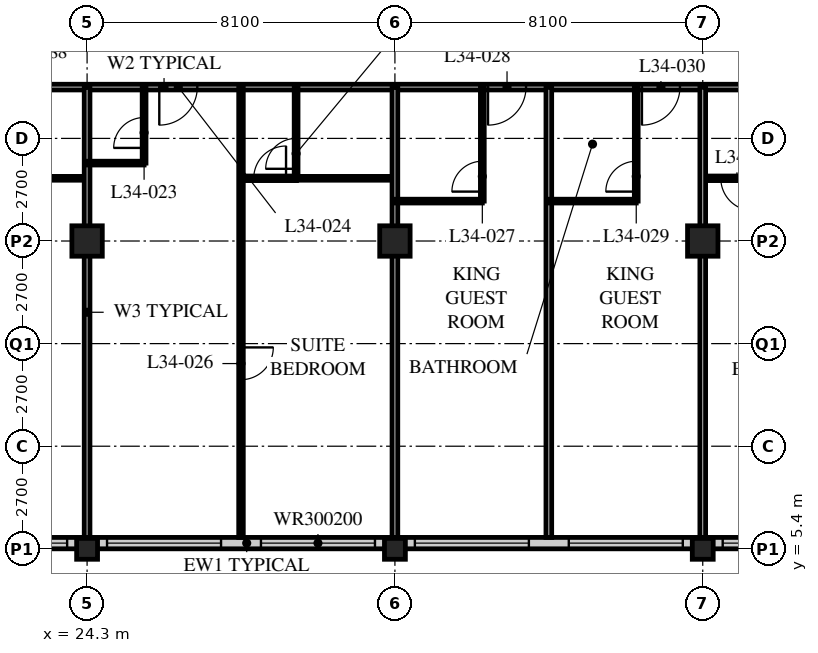
"""IFC4 building model, lengths in metres.
Left out: names, types, materials, properties, quantities, classifications, styles, units other than length and angle.
Written with IfcOpenShell. Run it as: python <this file> out.ifc"""

import sys

from ifc_helpers import new_model, si_unit, direction, frame, frame_2d, origin, origin_2d, place, context, subcontext, project, spatial, rectangle, hollow_rectangle, extrude, element, fill, save


model = new_model("IFC4")
c1 = context("Model", 3, precision=1e-05, world=origin(), true_north=direction((0.0, 1.0)))
c2 = subcontext(c1, "Body", "Model", "MODEL_VIEW")
j1 = project(units=[si_unit("LENGTHUNIT", "METRE"), si_unit("PLANEANGLEUNIT", "RADIAN")], contexts=[c1])
p1 = place(None, origin())
s1 = spatial("IfcSite", under=j1, at=p1, CompositionType="ELEMENT")
p2 = place(p1, origin())
s2 = spatial("IfcBuilding", under=s1, at=p2, CompositionType="ELEMENT")
p3 = place(p2, frame((0.0, 0.0, 134.0)))
s3 = spatial("IfcBuildingStorey", under=s2, at=p3, CompositionType="ELEMENT", Elevation=134.0)
p4 = place(p3, frame((24.3, 5.4, 0.0), z_axis=(0.0, 0.0, 1.0), x_axis=(1.0, 0.0, 0.0)))
e1 = element("IfcColumn", 1, at=p4, inside=s3, PredefinedType="COLUMN", context=c2, shape_type="SweptSolid", body=[
    extrude(hollow_rectangle(XDim=0.55, YDim=0.55, WallThickness=0.04, at=origin_2d()), origin(), (0.0, 0.0, 1.0), 3.4),
])
p5 = place(p3, frame((24.3, 13.5, 0.0), z_axis=(0.0, 0.0, 1.0), x_axis=(1.0, 0.0, 0.0)))
e2 = element("IfcColumn", 2, at=p5, inside=s3, PredefinedType="COLUMN", context=c2, shape_type="SweptSolid", body=[
    extrude(hollow_rectangle(XDim=0.8, YDim=0.8, WallThickness=0.08, at=origin_2d()), origin(), (0.0, 0.0, 1.0), 3.4),
])
p6 = place(p3, frame((32.4, 5.4, 0.0), z_axis=(0.0, 0.0, 1.0), x_axis=(1.0, 0.0, 0.0)))
e3 = element("IfcColumn", 3, at=p6, inside=s3, PredefinedType="COLUMN", context=c2, shape_type="SweptSolid", body=[
    extrude(hollow_rectangle(XDim=0.55, YDim=0.55, WallThickness=0.04, at=origin_2d()), origin(), (0.0, 0.0, 1.0), 3.4),
])
p7 = place(p3, frame((32.4, 13.5, 0.0), z_axis=(0.0, 0.0, 1.0), x_axis=(1.0, 0.0, 0.0)))
e4 = element("IfcColumn", 4, at=p7, inside=s3, PredefinedType="COLUMN", context=c2, shape_type="SweptSolid", body=[
    extrude(hollow_rectangle(XDim=0.8, YDim=0.8, WallThickness=0.08, at=origin_2d()), origin(), (0.0, 0.0, 1.0), 3.4),
])
p8 = place(p3, frame((40.5, 5.4, 0.0), z_axis=(0.0, 0.0, 1.0), x_axis=(1.0, 0.0, 0.0)))
e5 = element("IfcColumn", 5, at=p8, inside=s3, PredefinedType="COLUMN", context=c2, shape_type="SweptSolid", body=[
    extrude(hollow_rectangle(XDim=0.55, YDim=0.55, WallThickness=0.04, at=origin_2d()), origin(), (0.0, 0.0, 1.0), 3.4),
])
p9 = place(p3, frame((40.5, 13.5, 0.0), z_axis=(0.0, 0.0, 1.0), x_axis=(1.0, 0.0, 0.0)))
e6 = element("IfcColumn", 6, at=p9, inside=s3, PredefinedType="COLUMN", context=c2, shape_type="SweptSolid", body=[
    extrude(hollow_rectangle(XDim=0.8, YDim=0.8, WallThickness=0.08, at=origin_2d()), origin(), (0.0, 0.0, 1.0), 3.4),
])
p10 = place(p3, frame((8.4, 5.55, 0.0), z_axis=(0.0, 0.0, 1.0), x_axis=(1.0, 0.0, 0.0)))
e7 = element("IfcWall", 7, at=p10, inside=s3, PredefinedType="SOLIDWALL", context=c2, shape_type="SweptSolid", body=[
    extrude(rectangle(XDim=40.2, YDim=0.3, at=frame_2d((20.1, 0.0))), origin(), (0.0, 0.0, 1.0), 3.19),
])
p11 = place(p10, frame((0.225, 0.0, 0.9)))
e8 = element("IfcOpeningElement", 8, at=p11, cuts=e7, PredefinedType="OPENING", context=c2, shape_type="SweptSolid", body=[
    extrude(rectangle(XDim=3.0, YDim=2.0, at=frame_2d((1.5, 1.0))), frame((0.0, 0.16, 0.0), z_axis=(0.0, -1.0, 0.0), x_axis=(1.0, 0.0, 0.0)), (0.0, 0.0, 1.0), 0.32),
])
p12 = place(p10, frame((4.275, 0.0, 0.9)))
e9 = element("IfcOpeningElement", 9, at=p12, cuts=e7, PredefinedType="OPENING", context=c2, shape_type="SweptSolid", body=[
    extrude(rectangle(XDim=3.0, YDim=2.0, at=frame_2d((1.5, 1.0))), frame((0.0, 0.16, 0.0), z_axis=(0.0, -1.0, 0.0), x_axis=(1.0, 0.0, 0.0)), (0.0, 0.0, 1.0), 0.32),
])
p13 = place(p10, frame((8.325, 0.0, 0.9)))
e10 = element("IfcOpeningElement", 10, at=p13, cuts=e7, PredefinedType="OPENING", context=c2, shape_type="SweptSolid", body=[
    extrude(rectangle(XDim=3.0, YDim=2.0, at=frame_2d((1.5, 1.0))), frame((0.0, 0.16, 0.0), z_axis=(0.0, -1.0, 0.0), x_axis=(1.0, 0.0, 0.0)), (0.0, 0.0, 1.0), 0.32),
])
p14 = place(p10, frame((12.375, 0.0, 0.9)))
e11 = element("IfcOpeningElement", 11, at=p14, cuts=e7, PredefinedType="OPENING", context=c2, shape_type="SweptSolid", body=[
    extrude(rectangle(XDim=3.0, YDim=2.0, at=frame_2d((1.5, 1.0))), frame((0.0, 0.16, 0.0), z_axis=(0.0, -1.0, 0.0), x_axis=(1.0, 0.0, 0.0)), (0.0, 0.0, 1.0), 0.32),
])
p15 = place(p10, frame((16.425, 0.0, 0.9)))
e12 = element("IfcOpeningElement", 12, at=p15, cuts=e7, PredefinedType="OPENING", context=c2, shape_type="SweptSolid", body=[
    extrude(rectangle(XDim=3.0, YDim=2.0, at=frame_2d((1.5, 1.0))), frame((0.0, 0.16, 0.0), z_axis=(0.0, -1.0, 0.0), x_axis=(1.0, 0.0, 0.0)), (0.0, 0.0, 1.0), 0.32),
])
p16 = place(p10, frame((20.475, 0.0, 0.9)))
e13 = element("IfcOpeningElement", 13, at=p16, cuts=e7, PredefinedType="OPENING", context=c2, shape_type="SweptSolid", body=[
    extrude(rectangle(XDim=3.0, YDim=2.0, at=frame_2d((1.5, 1.0))), frame((0.0, 0.16, 0.0), z_axis=(0.0, -1.0, 0.0), x_axis=(1.0, 0.0, 0.0)), (0.0, 0.0, 1.0), 0.32),
])
p17 = place(p10, frame((24.525, 0.0, 0.9)))
e14 = element("IfcOpeningElement", 14, at=p17, cuts=e7, PredefinedType="OPENING", context=c2, shape_type="SweptSolid", body=[
    extrude(rectangle(XDim=3.0, YDim=2.0, at=frame_2d((1.5, 1.0))), frame((0.0, 0.16, 0.0), z_axis=(0.0, -1.0, 0.0), x_axis=(1.0, 0.0, 0.0)), (0.0, 0.0, 1.0), 0.32),
])
p18 = place(p10, frame((28.575, 0.0, 0.9)))
e15 = element("IfcOpeningElement", 15, at=p18, cuts=e7, PredefinedType="OPENING", context=c2, shape_type="SweptSolid", body=[
    extrude(rectangle(XDim=3.0, YDim=2.0, at=frame_2d((1.5, 1.0))), frame((0.0, 0.16, 0.0), z_axis=(0.0, -1.0, 0.0), x_axis=(1.0, 0.0, 0.0)), (0.0, 0.0, 1.0), 0.32),
])
p19 = place(p10, frame((32.625, 0.0, 0.9)))
e16 = element("IfcOpeningElement", 16, at=p19, cuts=e7, PredefinedType="OPENING", context=c2, shape_type="SweptSolid", body=[
    extrude(rectangle(XDim=3.0, YDim=2.0, at=frame_2d((1.5, 1.0))), frame((0.0, 0.16, 0.0), z_axis=(0.0, -1.0, 0.0), x_axis=(1.0, 0.0, 0.0)), (0.0, 0.0, 1.0), 0.32),
])
p20 = place(p10, frame((36.675, 0.0, 0.9)))
e17 = element("IfcOpeningElement", 17, at=p20, cuts=e7, PredefinedType="OPENING", context=c2, shape_type="SweptSolid", body=[
    extrude(rectangle(XDim=3.0, YDim=2.0, at=frame_2d((1.5, 1.0))), frame((0.0, 0.16, 0.0), z_axis=(0.0, -1.0, 0.0), x_axis=(1.0, 0.0, 0.0)), (0.0, 0.0, 1.0), 0.32),
])
p21 = place(p3, frame((8.1, 17.55, 0.0), z_axis=(0.0, 0.0, 1.0), x_axis=(1.0, 0.0, 0.0)))
e18 = element("IfcWall", 18, at=p21, inside=s3, PredefinedType="PARTITIONING", context=c2, shape_type="SweptSolid", body=[
    extrude(rectangle(XDim=36.45, YDim=0.15, at=frame_2d((18.225, 0.0))), origin(), (0.0, 0.0, 1.0), 3.19),
])
p22 = place(p21, frame((9.625, 0.0, 0.0)))
e19 = element("IfcOpeningElement", 19, at=p22, cuts=e18, PredefinedType="OPENING", context=c2, shape_type="SweptSolid", body=[
    extrude(rectangle(XDim=1.0, YDim=2.1, at=frame_2d((0.5, 1.05))), frame((0.0, 0.085, 0.0), z_axis=(0.0, -1.0, 0.0), x_axis=(1.0, 0.0, 0.0)), (0.0, 0.0, 1.0), 0.17),
])
p23 = place(p21, frame((18.1, 0.0, 0.0)))
e20 = element("IfcOpeningElement", 20, at=p23, cuts=e18, PredefinedType="OPENING", context=c2, shape_type="SweptSolid", body=[
    extrude(rectangle(XDim=1.0, YDim=2.1, at=frame_2d((0.5, 1.05))), frame((0.0, 0.085, 0.0), z_axis=(0.0, -1.0, 0.0), x_axis=(1.0, 0.0, 0.0)), (0.0, 0.0, 1.0), 0.17),
])
p24 = place(p21, frame((26.75, 0.0, 0.0)))
e21 = element("IfcOpeningElement", 21, at=p24, cuts=e18, PredefinedType="OPENING", context=c2, shape_type="SweptSolid", body=[
    extrude(rectangle(XDim=1.0, YDim=2.1, at=frame_2d((0.5, 1.05))), frame((0.0, 0.085, 0.0), z_axis=(0.0, -1.0, 0.0), x_axis=(1.0, 0.0, 0.0)), (0.0, 0.0, 1.0), 0.17),
])
p25 = place(p21, frame((30.8, 0.0, 0.0)))
e22 = element("IfcOpeningElement", 22, at=p25, cuts=e18, PredefinedType="OPENING", context=c2, shape_type="SweptSolid", body=[
    extrude(rectangle(XDim=1.0, YDim=2.1, at=frame_2d((0.5, 1.05))), frame((0.0, 0.085, 0.0), z_axis=(0.0, -1.0, 0.0), x_axis=(1.0, 0.0, 0.0)), (0.0, 0.0, 1.0), 0.17),
])
p26 = place(p21, frame((1.525, 0.0, 0.0)))
e23 = element("IfcOpeningElement", 23, at=p26, cuts=e18, PredefinedType="OPENING", context=c2, shape_type="SweptSolid", body=[
    extrude(rectangle(XDim=1.0, YDim=2.1, at=frame_2d((0.5, 1.05))), frame((0.0, 0.085, 0.0), z_axis=(0.0, -1.0, 0.0), x_axis=(1.0, 0.0, 0.0)), (0.0, 0.0, 1.0), 0.17),
])
p27 = place(p21, frame((33.925, 0.0, 0.0)))
e24 = element("IfcOpeningElement", 24, at=p27, cuts=e18, PredefinedType="OPENING", context=c2, shape_type="SweptSolid", body=[
    extrude(rectangle(XDim=1.0, YDim=2.1, at=frame_2d((0.5, 1.05))), frame((0.0, 0.085, 0.0), z_axis=(0.0, -1.0, 0.0), x_axis=(1.0, 0.0, 0.0)), (0.0, 0.0, 1.0), 0.17),
])
p28 = place(p3, frame((21.7, 15.15, 0.0), z_axis=(0.0, 0.0, 1.0), x_axis=(1.0, 0.0, 0.0)))
e25 = element("IfcWall", 25, at=p28, inside=s3, PredefinedType="PARTITIONING", context=c2, shape_type="SweptSolid", body=[
    extrude(rectangle(XDim=2.6, YDim=0.1, at=frame_2d((1.3, 0.0))), origin(), (0.0, 0.0, 1.0), 3.19),
])
p29 = place(p3, frame((24.3, 17.55, 0.0), z_axis=(0.0, 0.0, 1.0), x_axis=(0.0, -1.0, 0.0)))
e26 = element("IfcWall", 26, at=p29, inside=s3, PredefinedType="PARTITIONING", context=c2, shape_type="SweptSolid", body=[
    extrude(rectangle(XDim=11.85, YDim=0.15, at=frame_2d((5.925, 0.0))), origin(), (0.0, 0.0, 1.0), 2.578),
])
p30 = place(p3, frame((24.3, 15.55, 0.0), z_axis=(0.0, 0.0, 1.0), x_axis=(1.0, 0.0, 0.0)))
e27 = element("IfcWall", 27, at=p30, inside=s3, PredefinedType="PARTITIONING", context=c2, shape_type="SweptSolid", body=[
    extrude(rectangle(XDim=1.5, YDim=0.1, at=frame_2d((0.75, 0.0))), origin(), (0.0, 0.0, 1.0), 3.19),
])
p31 = place(p3, frame((25.8, 17.55, 0.0), z_axis=(0.0, 0.0, 1.0), x_axis=(0.0, -1.0, 0.0)))
e28 = element("IfcWall", 28, at=p31, inside=s3, PredefinedType="PARTITIONING", context=c2, shape_type="SweptSolid", body=[
    extrude(rectangle(XDim=2.0, YDim=0.1, at=frame_2d((1.0, 0.0))), origin(), (0.0, 0.0, 1.0), 3.19),
])
p32 = place(p31, frame((0.8, 0.0, 0.0)))
e29 = element("IfcOpeningElement", 29, at=p32, cuts=e28, PredefinedType="OPENING", context=c2, shape_type="SweptSolid", body=[
    extrude(rectangle(XDim=0.8, YDim=2.1, at=frame_2d((0.4, 1.05))), frame((0.0, 0.06, 0.0), z_axis=(0.0, -1.0, 0.0), x_axis=(1.0, 0.0, 0.0)), (0.0, 0.0, 1.0), 0.12),
])
p33 = place(p3, frame((29.8, 15.15, 0.0), z_axis=(0.0, 0.0, 1.0), x_axis=(1.0, 0.0, 0.0)))
e30 = element("IfcWall", 30, at=p33, inside=s3, PredefinedType="PARTITIONING", context=c2, shape_type="SweptSolid", body=[
    extrude(rectangle(XDim=2.6, YDim=0.1, at=frame_2d((1.3, 0.0))), origin(), (0.0, 0.0, 1.0), 3.19),
])
p34 = place(p3, frame((29.8, 17.55, 0.0), z_axis=(0.0, 0.0, 1.0), x_axis=(0.0, -1.0, 0.0)))
e31 = element("IfcWall", 31, at=p34, inside=s3, PredefinedType="PARTITIONING", context=c2, shape_type="SweptSolid", body=[
    extrude(rectangle(XDim=2.4, YDim=0.1, at=frame_2d((1.2, 0.0))), origin(), (0.0, 0.0, 1.0), 3.19),
])
p35 = place(p34, frame((1.35, 0.0, 0.0)))
e32 = element("IfcOpeningElement", 32, at=p35, cuts=e31, PredefinedType="OPENING", context=c2, shape_type="SweptSolid", body=[
    extrude(rectangle(XDim=0.8, YDim=2.1, at=frame_2d((0.4, 1.05))), frame((0.0, 0.06, 0.0), z_axis=(0.0, -1.0, 0.0), x_axis=(1.0, 0.0, 0.0)), (0.0, 0.0, 1.0), 0.12),
])
p36 = place(p3, frame((28.35, 17.55, 0.0), z_axis=(0.0, 0.0, 1.0), x_axis=(0.0, -1.0, 0.0)))
e33 = element("IfcWall", 33, at=p36, inside=s3, PredefinedType="PARTITIONING", context=c2, shape_type="SweptSolid", body=[
    extrude(rectangle(XDim=11.85, YDim=0.12, at=frame_2d((5.925, 0.0))), origin(), (0.0, 0.0, 1.0), 3.19),
])
p37 = place(p36, frame((6.85, 0.0, 0.0)))
e34 = element("IfcOpeningElement", 34, at=p37, cuts=e33, PredefinedType="OPENING", context=c2, shape_type="SweptSolid", body=[
    extrude(rectangle(XDim=0.85, YDim=2.1, at=frame_2d((0.425, 1.05))), frame((0.0, 0.07, 0.0), z_axis=(0.0, -1.0, 0.0), x_axis=(1.0, 0.0, 0.0)), (0.0, 0.0, 1.0), 0.14),
])
p38 = place(p3, frame((32.4, 17.55, 0.0), z_axis=(0.0, 0.0, 1.0), x_axis=(0.0, -1.0, 0.0)))
e35 = element("IfcWall", 35, at=p38, inside=s3, PredefinedType="PARTITIONING", context=c2, shape_type="SweptSolid", body=[
    extrude(rectangle(XDim=11.85, YDim=0.15, at=frame_2d((5.925, 0.0))), origin(), (0.0, 0.0, 1.0), 2.578),
])
p39 = place(p3, frame((32.4, 14.55, 0.0), z_axis=(0.0, 0.0, 1.0), x_axis=(1.0, 0.0, 0.0)))
e36 = element("IfcWall", 36, at=p39, inside=s3, PredefinedType="PARTITIONING", context=c2, shape_type="SweptSolid", body=[
    extrude(rectangle(XDim=2.3, YDim=0.1, at=frame_2d((1.15, 0.0))), origin(), (0.0, 0.0, 1.0), 3.19),
])
p40 = place(p3, frame((34.7, 17.55, 0.0), z_axis=(0.0, 0.0, 1.0), x_axis=(0.0, -1.0, 0.0)))
e37 = element("IfcWall", 37, at=p40, inside=s3, PredefinedType="PARTITIONING", context=c2, shape_type="SweptSolid", body=[
    extrude(rectangle(XDim=3.0, YDim=0.1, at=frame_2d((1.5, 0.0))), origin(), (0.0, 0.0, 1.0), 3.19),
])
p41 = place(p40, frame((1.95, 0.0, 0.0)))
e38 = element("IfcOpeningElement", 38, at=p41, cuts=e37, PredefinedType="OPENING", context=c2, shape_type="SweptSolid", body=[
    extrude(rectangle(XDim=0.8, YDim=2.1, at=frame_2d((0.4, 1.05))), frame((0.0, 0.06, 0.0), z_axis=(0.0, -1.0, 0.0), x_axis=(1.0, 0.0, 0.0)), (0.0, 0.0, 1.0), 0.12),
])
p42 = place(p3, frame((36.45, 17.55, 0.0), z_axis=(0.0, 0.0, 1.0), x_axis=(0.0, -1.0, 0.0)))
e39 = element("IfcWall", 39, at=p42, inside=s3, PredefinedType="PARTITIONING", context=c2, shape_type="SweptSolid", body=[
    extrude(rectangle(XDim=11.85, YDim=0.15, at=frame_2d((5.925, 0.0))), origin(), (0.0, 0.0, 1.0), 3.19),
])
p43 = place(p3, frame((36.45, 14.55, 0.0), z_axis=(0.0, 0.0, 1.0), x_axis=(1.0, 0.0, 0.0)))
e40 = element("IfcWall", 40, at=p43, inside=s3, PredefinedType="PARTITIONING", context=c2, shape_type="SweptSolid", body=[
    extrude(rectangle(XDim=2.3, YDim=0.1, at=frame_2d((1.15, 0.0))), origin(), (0.0, 0.0, 1.0), 3.19),
])
p44 = place(p3, frame((38.75, 17.55, 0.0), z_axis=(0.0, 0.0, 1.0), x_axis=(0.0, -1.0, 0.0)))
e41 = element("IfcWall", 41, at=p44, inside=s3, PredefinedType="PARTITIONING", context=c2, shape_type="SweptSolid", body=[
    extrude(rectangle(XDim=3.0, YDim=0.1, at=frame_2d((1.5, 0.0))), origin(), (0.0, 0.0, 1.0), 3.19),
])
p45 = place(p44, frame((1.95, 0.0, 0.0)))
e42 = element("IfcOpeningElement", 42, at=p45, cuts=e41, PredefinedType="OPENING", context=c2, shape_type="SweptSolid", body=[
    extrude(rectangle(XDim=0.8, YDim=2.1, at=frame_2d((0.4, 1.05))), frame((0.0, 0.06, 0.0), z_axis=(0.0, -1.0, 0.0), x_axis=(1.0, 0.0, 0.0)), (0.0, 0.0, 1.0), 0.12),
])
p46 = place(p3, frame((40.5, 15.15, 0.0), z_axis=(0.0, 0.0, 1.0), x_axis=(1.0, 0.0, 0.0)))
e43 = element("IfcWall", 43, at=p46, inside=s3, PredefinedType="PARTITIONING", context=c2, shape_type="SweptSolid", body=[
    extrude(rectangle(XDim=8.05, YDim=0.12, at=frame_2d((4.025, 0.0))), origin(), (0.0, 0.0, 1.0), 3.19),
])
p47 = place(p46, frame((0.475, 0.0, 0.0)))
e44 = element("IfcOpeningElement", 44, at=p47, cuts=e43, PredefinedType="OPENING", context=c2, shape_type="SweptSolid", body=[
    extrude(rectangle(XDim=0.85, YDim=2.1, at=frame_2d((0.425, 1.05))), frame((0.0, 0.07, 0.0), z_axis=(0.0, -1.0, 0.0), x_axis=(1.0, 0.0, 0.0)), (0.0, 0.0, 1.0), 0.14),
])
p48 = place(p46, frame((4.325, 0.0, 0.0)))
e45 = element("IfcOpeningElement", 45, at=p48, cuts=e43, PredefinedType="OPENING", context=c2, shape_type="SweptSolid", body=[
    extrude(rectangle(XDim=0.85, YDim=2.1, at=frame_2d((0.425, 1.05))), frame((0.0, 0.07, 0.0), z_axis=(0.0, -1.0, 0.0), x_axis=(1.0, 0.0, 0.0)), (0.0, 0.0, 1.0), 0.14),
])
p49 = place(p3, frame((40.5, 17.55, 0.0), z_axis=(0.0, 0.0, 1.0), x_axis=(0.0, -1.0, 0.0)))
e46 = element("IfcWall", 46, at=p49, inside=s3, PredefinedType="PARTITIONING", context=c2, shape_type="SweptSolid", body=[
    extrude(rectangle(XDim=11.85, YDim=0.15, at=frame_2d((5.925, 0.0))), origin(), (0.0, 0.0, 1.0), 2.578),
])
p50 = place(p3, frame((29.81, 15.15, 0.0), z_axis=(0.0, 0.0, 1.0), x_axis=(-1.0, 0.0, 0.0)))
e47 = element("IfcWall", 47, at=p50, inside=s3, PredefinedType="PARTITIONING", context=c2, shape_type="SweptSolid", body=[
    extrude(rectangle(XDim=1.46, YDim=0.12, at=frame_2d((0.73, 0.0))), origin(), (0.0, 0.0, 1.0), 3.19),
])
p51 = place(p50, frame((0.275, 0.0, 0.0)))
e48 = element("IfcOpeningElement", 48, at=p51, cuts=e47, PredefinedType="OPENING", context=c2, shape_type="SweptSolid", body=[
    extrude(rectangle(XDim=0.85, YDim=2.1, at=frame_2d((0.425, 1.05))), frame((0.0, 0.07, 0.0), z_axis=(0.0, -1.0, 0.0), x_axis=(1.0, 0.0, 0.0)), (0.0, 0.0, 1.0), 0.14),
])
p52 = place(p14, origin())
e49 = element("IfcWindow", 49, at=p52, inside=s3, PartitioningType="SINGLE_PANEL", PredefinedType="WINDOW", context=c2, shape_type="SweptSolid", body=[
    extrude(rectangle(XDim=3.0, YDim=2.0, at=frame_2d((1.5, 1.0))), frame((0.0, 0.03, 0.0), z_axis=(0.0, -1.0, 0.0), x_axis=(1.0, 0.0, 0.0)), (0.0, 0.0, 1.0), 0.06),
])
fill(e11, e49)
p53 = place(p15, origin())
e50 = element("IfcWindow", 50, at=p53, inside=s3, PartitioningType="SINGLE_PANEL", PredefinedType="WINDOW", context=c2, shape_type="SweptSolid", body=[
    extrude(rectangle(XDim=3.0, YDim=2.0, at=frame_2d((1.5, 1.0))), frame((0.0, 0.03, 0.0), z_axis=(0.0, -1.0, 0.0), x_axis=(1.0, 0.0, 0.0)), (0.0, 0.0, 1.0), 0.06),
])
fill(e12, e50)
p54 = place(p16, origin())
e51 = element("IfcWindow", 51, at=p54, inside=s3, PartitioningType="SINGLE_PANEL", PredefinedType="WINDOW", context=c2, shape_type="SweptSolid", body=[
    extrude(rectangle(XDim=3.0, YDim=2.0, at=frame_2d((1.5, 1.0))), frame((0.0, 0.03, 0.0), z_axis=(0.0, -1.0, 0.0), x_axis=(1.0, 0.0, 0.0)), (0.0, 0.0, 1.0), 0.06),
])
fill(e13, e51)
p55 = place(p17, origin())
e52 = element("IfcWindow", 52, at=p55, inside=s3, PartitioningType="SINGLE_PANEL", PredefinedType="WINDOW", context=c2, shape_type="SweptSolid", body=[
    extrude(rectangle(XDim=3.0, YDim=2.0, at=frame_2d((1.5, 1.0))), frame((0.0, 0.03, 0.0), z_axis=(0.0, -1.0, 0.0), x_axis=(1.0, 0.0, 0.0)), (0.0, 0.0, 1.0), 0.06),
])
fill(e14, e52)
p56 = place(p18, origin())
e53 = element("IfcWindow", 53, at=p56, inside=s3, PartitioningType="SINGLE_PANEL", PredefinedType="WINDOW", context=c2, shape_type="SweptSolid", body=[
    extrude(rectangle(XDim=3.0, YDim=2.0, at=frame_2d((1.5, 1.0))), frame((0.0, 0.03, 0.0), z_axis=(0.0, -1.0, 0.0), x_axis=(1.0, 0.0, 0.0)), (0.0, 0.0, 1.0), 0.06),
])
fill(e15, e53)
p57 = place(p19, origin())
e54 = element("IfcWindow", 54, at=p57, inside=s3, PartitioningType="SINGLE_PANEL", PredefinedType="WINDOW", context=c2, shape_type="SweptSolid", body=[
    extrude(rectangle(XDim=3.0, YDim=2.0, at=frame_2d((1.5, 1.0))), frame((0.0, 0.03, 0.0), z_axis=(0.0, -1.0, 0.0), x_axis=(1.0, 0.0, 0.0)), (0.0, 0.0, 1.0), 0.06),
])
fill(e16, e54)
p58 = place(p32, origin())
e55 = element("IfcDoor", 55, at=p58, inside=s3, OperationType="SINGLE_SWING_LEFT", PredefinedType="DOOR", context=c2, shape_type="SweptSolid", body=[
    extrude(rectangle(XDim=0.8, YDim=2.1, at=frame_2d((0.4, 1.05))), frame((0.0, 0.025, 0.0), z_axis=(0.0, -1.0, 0.0), x_axis=(1.0, 0.0, 0.0)), (0.0, 0.0, 1.0), 0.05),
])
fill(e29, e55)
p59 = place(p23, origin())
e56 = element("IfcDoor", 56, at=p59, inside=s3, OperationType="SINGLE_SWING_RIGHT", PredefinedType="DOOR", context=c2, shape_type="SweptSolid", body=[
    extrude(rectangle(XDim=1.0, YDim=2.1, at=frame_2d((0.5, 1.05))), frame((0.0, 0.025, 0.0), z_axis=(0.0, -1.0, 0.0), x_axis=(1.0, 0.0, 0.0)), (0.0, 0.0, 1.0), 0.05),
])
fill(e20, e56)
p60 = place(p35, origin())
e57 = element("IfcDoor", 57, at=p60, inside=s3, OperationType="SINGLE_SWING_LEFT", PredefinedType="DOOR", context=c2, shape_type="SweptSolid", body=[
    extrude(rectangle(XDim=0.8, YDim=2.1, at=frame_2d((0.4, 1.05))), frame((0.0, 0.025, 0.0), z_axis=(0.0, -1.0, 0.0), x_axis=(1.0, 0.0, 0.0)), (0.0, 0.0, 1.0), 0.05),
])
fill(e32, e57)
p61 = place(p37, origin())
e58 = element("IfcDoor", 58, at=p61, inside=s3, OperationType="SINGLE_SWING_LEFT", PredefinedType="DOOR", context=c2, shape_type="SweptSolid", body=[
    extrude(rectangle(XDim=0.85, YDim=2.1, at=frame_2d((0.425, 1.05))), frame((0.0, 0.025, 0.0), z_axis=(0.0, -1.0, 0.0), x_axis=(1.0, 0.0, 0.0)), (0.0, 0.0, 1.0), 0.05),
])
fill(e34, e58)
p62 = place(p41, origin())
e59 = element("IfcDoor", 59, at=p62, inside=s3, OperationType="SINGLE_SWING_LEFT", PredefinedType="DOOR", context=c2, shape_type="SweptSolid", body=[
    extrude(rectangle(XDim=0.8, YDim=2.1, at=frame_2d((0.4, 1.05))), frame((0.0, 0.025, 0.0), z_axis=(0.0, -1.0, 0.0), x_axis=(1.0, 0.0, 0.0)), (0.0, 0.0, 1.0), 0.05),
])
fill(e38, e59)
p63 = place(p24, origin())
e60 = element("IfcDoor", 60, at=p63, inside=s3, OperationType="SINGLE_SWING_RIGHT", PredefinedType="DOOR", context=c2, shape_type="SweptSolid", body=[
    extrude(rectangle(XDim=1.0, YDim=2.1, at=frame_2d((0.5, 1.05))), frame((0.0, 0.025, 0.0), z_axis=(0.0, -1.0, 0.0), x_axis=(1.0, 0.0, 0.0)), (0.0, 0.0, 1.0), 0.05),
])
fill(e21, e60)
p64 = place(p45, origin())
e61 = element("IfcDoor", 61, at=p64, inside=s3, OperationType="SINGLE_SWING_LEFT", PredefinedType="DOOR", context=c2, shape_type="SweptSolid", body=[
    extrude(rectangle(XDim=0.8, YDim=2.1, at=frame_2d((0.4, 1.05))), frame((0.0, 0.025, 0.0), z_axis=(0.0, -1.0, 0.0), x_axis=(1.0, 0.0, 0.0)), (0.0, 0.0, 1.0), 0.05),
])
fill(e42, e61)
p65 = place(p25, origin())
e62 = element("IfcDoor", 62, at=p65, inside=s3, OperationType="SINGLE_SWING_RIGHT", PredefinedType="DOOR", context=c2, shape_type="SweptSolid", body=[
    extrude(rectangle(XDim=1.0, YDim=2.1, at=frame_2d((0.5, 1.05))), frame((0.0, 0.025, 0.0), z_axis=(0.0, -1.0, 0.0), x_axis=(1.0, 0.0, 0.0)), (0.0, 0.0, 1.0), 0.05),
])
fill(e22, e62)
p66 = place(p47, origin())
e63 = element("IfcDoor", 63, at=p66, inside=s3, OperationType="SINGLE_SWING_LEFT", PredefinedType="DOOR", context=c2, shape_type="SweptSolid", body=[
    extrude(rectangle(XDim=0.85, YDim=2.1, at=frame_2d((0.425, 1.05))), frame((0.0, 0.025, 0.0), z_axis=(0.0, -1.0, 0.0), x_axis=(1.0, 0.0, 0.0)), (0.0, 0.0, 1.0), 0.05),
])
fill(e44, e63)
p67 = place(p51, origin())
e64 = element("IfcDoor", 64, at=p67, inside=s3, OperationType="SINGLE_SWING_RIGHT", PredefinedType="DOOR", context=c2, shape_type="SweptSolid", body=[
    extrude(rectangle(XDim=0.85, YDim=2.1, at=frame_2d((0.425, 1.05))), frame((0.0, 0.025, 0.0), z_axis=(0.0, -1.0, 0.0), x_axis=(1.0, 0.0, 0.0)), (0.0, 0.0, 1.0), 0.05),
])
fill(e48, e64)
save(model, sys.argv[1])
